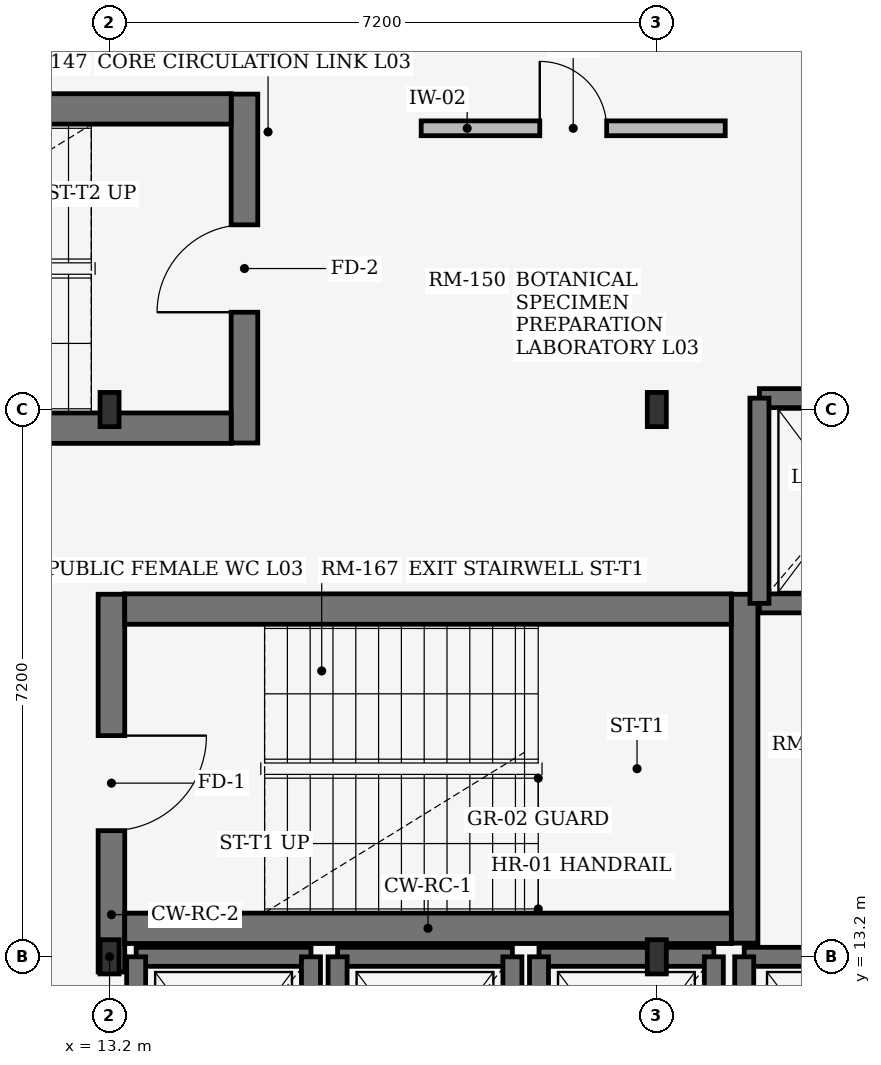
"""IFC4 building model, lengths in metres.
Left out: names, types, materials, properties, quantities, classifications, styles, units other than length and angle.
Written with IfcOpenShell. Run it as: python <this file> out.ifc"""

import sys

from ifc_helpers import new_model, si_unit, direction, frame, frame_2d, origin, origin_2d, place, context, subcontext, project, spatial, rectangle, i_section, extrude, element, fill, save


model = new_model("IFC4")
c1 = context("Model", 3, precision=1e-05, world=origin(), true_north=direction((0.0, 1.0)))
c2 = subcontext(c1, "Body", "Model", "MODEL_VIEW")
j1 = project(units=[si_unit("LENGTHUNIT", "METRE"), si_unit("PLANEANGLEUNIT", "RADIAN")], contexts=[c1])
p1 = place(None, origin())
s1 = spatial("IfcSite", under=j1, at=p1, CompositionType="ELEMENT")
p2 = place(p1, origin())
s2 = spatial("IfcBuilding", under=s1, at=p2, CompositionType="ELEMENT")
p3 = place(p2, frame((0.0, 0.0, 13.2)))
s3 = spatial("IfcBuildingStorey", under=s2, at=p3, CompositionType="ELEMENT", Elevation=13.2)
for number, where, z_axis, x_axis in (
    (1, (13.2, 13.2, 0.0), (0.0, 0.0, 1.0), (1.0, 0.0, 0.0)),
    (2, (13.2, 20.4, 0.0), (0.0, 0.0, 1.0), (1.0, 0.0, 0.0)),
    (3, (20.4, 13.2, 0.0), (0.0, 0.0, 1.0), (1.0, 0.0, 0.0)),
    (4, (20.4, 20.4, 0.0), (0.0, 0.0, 1.0), (1.0, 0.0, 0.0)),
):
    element("IfcColumn", number, at=place(p3, frame(where, z_axis=z_axis, x_axis=x_axis)), inside=s3, PredefinedType="COLUMN", context=c2, shape_type="SweptSolid", body=[
        extrude(i_section(OverallWidth=0.25, OverallDepth=0.45, WebThickness=0.011, FlangeThickness=0.014, at=origin_2d()), origin(), (0.0, 0.0, 1.0), 3.635),
    ])
p4 = place(p3, frame((13.225, 13.0, 0.0), z_axis=(0.0, 0.0, 1.0), x_axis=(0.0, 1.0, 0.0)))
e5 = element("IfcWall", 5, at=p4, inside=s3, PredefinedType="SHEAR", context=c2, shape_type="SweptSolid", body=[
    extrude(rectangle(XDim=4.97, YDim=0.35, at=frame_2d((2.485, 0.0))), origin(), (0.0, 0.0, 1.0), 3.635),
])
p5 = place(p4, frame((1.86, 0.0, 0.0)))
e6 = element("IfcOpeningElement", 6, at=p5, cuts=e5, PredefinedType="OPENING", context=c2, shape_type="SweptSolid", body=[
    extrude(rectangle(XDim=1.25, YDim=2.2, at=frame_2d((0.625, 1.1))), frame((0.0, 0.185, 0.0), z_axis=(0.0, -1.0, 0.0), x_axis=(1.0, 0.0, 0.0)), (0.0, 0.0, 1.0), 0.37),
])
p6 = place(p3, frame((21.555, 13.38, 0.0), z_axis=(0.0, 0.0, 1.0), x_axis=(0.0, 1.0, 0.0)))
e7 = element("IfcWall", 7, at=p6, inside=s3, PredefinedType="SHEAR", context=c2, shape_type="SweptSolid", body=[
    extrude(rectangle(XDim=4.59, YDim=0.35, at=frame_2d((2.295, 0.0))), origin(), (0.0, 0.0, 1.0), 3.635),
])
for number, where, z_axis, x_axis in (
    (8, (13.4, 13.575, 0.0), (0.0, 0.0, 1.0), (1.0, 0.0, 0.0)),
    (9, (13.4, 17.775, 0.0), (0.0, 0.0, 1.0), (1.0, 0.0, 0.0)),
):
    element("IfcWall", number, at=place(p3, frame(where, z_axis=z_axis, x_axis=x_axis)), inside=s3, PredefinedType="SHEAR", context=c2, shape_type="SweptSolid", body=[
        extrude(rectangle(XDim=7.98, YDim=0.4, at=frame_2d((3.99, 0.0))), origin(), (0.0, 0.0, 1.0), 3.635),
    ])
p7 = place(p3, frame((14.975, 24.55, 0.0), z_axis=(0.0, 0.0, 1.0), x_axis=(0.0, -1.0, 0.0)))
e10 = element("IfcWall", 10, at=p7, inside=s3, PredefinedType="SHEAR", context=c2, shape_type="SweptSolid", body=[
    extrude(rectangle(XDim=4.59, YDim=0.35, at=frame_2d((2.295, 0.0))), origin(), (0.0, 0.0, 1.0), 3.635),
])
p8 = place(p7, frame((1.72, 0.0, 0.0)))
e11 = element("IfcOpeningElement", 11, at=p8, cuts=e10, PredefinedType="OPENING", context=c2, shape_type="SweptSolid", body=[
    extrude(rectangle(XDim=1.15, YDim=2.2, at=frame_2d((0.575, 1.1))), frame((0.0, 0.185, 0.0), z_axis=(0.0, -1.0, 0.0), x_axis=(1.0, 0.0, 0.0)), (0.0, 0.0, 1.0), 0.37),
])
for number, where, z_axis, x_axis in (
    (12, (14.8, 24.355, 0.0), (0.0, 0.0, 1.0), (-1.0, 0.0, 0.0)),
    (13, (14.8, 20.155, 0.0), (0.0, 0.0, 1.0), (-1.0, 0.0, 0.0)),
):
    element("IfcWall", number, at=place(p3, frame(where, z_axis=z_axis, x_axis=x_axis)), inside=s3, PredefinedType="SHEAR", context=c2, shape_type="SweptSolid", body=[
        extrude(rectangle(XDim=7.98, YDim=0.4, at=frame_2d((3.99, 0.0))), origin(), (0.0, 0.0, 1.0), 3.635),
    ])
p9 = place(p3, frame((21.75, 17.85, 0.0), z_axis=(0.0, 0.0, 1.0), x_axis=(1.0, 0.0, 0.0)))
e14 = element("IfcWall", 14, at=p9, inside=s3, PredefinedType="SHEAR", context=c2, shape_type="SweptSolid", body=[
    extrude(rectangle(XDim=2.3, YDim=0.25, at=frame_2d((1.15, 0.0))), origin(), (0.0, 0.0, 1.0), 3.635),
])
p10 = place(p9, frame((0.6, 0.0, 0.0)))
e15 = element("IfcOpeningElement", 15, at=p10, cuts=e14, PredefinedType="OPENING", context=c2, shape_type="SweptSolid", body=[
    extrude(rectangle(XDim=1.1, YDim=2.2, at=frame_2d((0.55, 1.1))), frame((0.0, 0.135, 0.0), z_axis=(0.0, -1.0, 0.0), x_axis=(1.0, 0.0, 0.0)), (0.0, 0.0, 1.0), 0.27),
])
p11 = place(p3, frame((21.75, 20.55, 0.0), z_axis=(0.0, 0.0, 1.0), x_axis=(1.0, 0.0, 0.0)))
e16 = element("IfcWall", 16, at=p11, inside=s3, PredefinedType="SHEAR", context=c2, shape_type="SweptSolid", body=[
    extrude(rectangle(XDim=2.3, YDim=0.25, at=frame_2d((1.15, 0.0))), origin(), (0.0, 0.0, 1.0), 3.635),
])
p12 = place(p3, frame((21.75, 17.85, 0.0), z_axis=(0.0, 0.0, 1.0), x_axis=(0.0, 1.0, 0.0)))
e17 = element("IfcWall", 17, at=p12, inside=s3, PredefinedType="SHEAR", context=c2, shape_type="SweptSolid", body=[
    extrude(rectangle(XDim=2.7, YDim=0.25, at=frame_2d((1.35, 0.0))), origin(), (0.0, 0.0, 1.0), 3.635),
])
p13 = place(p3, frame((13.55, 13.2, 0.0), z_axis=(0.0, 0.0, 1.0), x_axis=(1.0, 0.0, 0.0)))
e18 = element("IfcWall", 18, at=p13, inside=s3, PredefinedType="SHEAR", context=c2, shape_type="SweptSolid", body=[
    extrude(rectangle(XDim=2.3, YDim=0.25, at=frame_2d((1.15, 0.0))), origin(), (0.0, 0.0, 1.0), 3.635),
])
for number, where, z_axis, x_axis in (
    (19, (13.55, 10.4, 0.0), (0.0, 0.0, 1.0), (0.0, 1.0, 0.0)),
    (20, (15.85, 10.4, 0.0), (0.0, 0.0, 1.0), (0.0, 1.0, 0.0)),
):
    element("IfcWall", number, at=place(p3, frame(where, z_axis=z_axis, x_axis=x_axis)), inside=s3, PredefinedType="SHEAR", context=c2, shape_type="SweptSolid", body=[
        extrude(rectangle(XDim=2.8, YDim=0.25, at=frame_2d((1.4, 0.0))), origin(), (0.0, 0.0, 1.0), 3.635),
    ])
p14 = place(p3, frame((16.2, 13.2, 0.0), z_axis=(0.0, 0.0, 1.0), x_axis=(1.0, 0.0, 0.0)))
e21 = element("IfcWall", 21, at=p14, inside=s3, PredefinedType="SHEAR", context=c2, shape_type="SweptSolid", body=[
    extrude(rectangle(XDim=2.3, YDim=0.25, at=frame_2d((1.15, 0.0))), origin(), (0.0, 0.0, 1.0), 3.635),
])
for number, where, z_axis, x_axis in (
    (22, (16.2, 10.4, 0.0), (0.0, 0.0, 1.0), (0.0, 1.0, 0.0)),
    (23, (18.5, 10.4, 0.0), (0.0, 0.0, 1.0), (0.0, 1.0, 0.0)),
):
    element("IfcWall", number, at=place(p3, frame(where, z_axis=z_axis, x_axis=x_axis)), inside=s3, PredefinedType="SHEAR", context=c2, shape_type="SweptSolid", body=[
        extrude(rectangle(XDim=2.8, YDim=0.25, at=frame_2d((1.4, 0.0))), origin(), (0.0, 0.0, 1.0), 3.635),
    ])
p15 = place(p3, frame((18.85, 13.2, 0.0), z_axis=(0.0, 0.0, 1.0), x_axis=(1.0, 0.0, 0.0)))
e24 = element("IfcWall", 24, at=p15, inside=s3, PredefinedType="SHEAR", context=c2, shape_type="SweptSolid", body=[
    extrude(rectangle(XDim=2.3, YDim=0.25, at=frame_2d((1.15, 0.0))), origin(), (0.0, 0.0, 1.0), 3.635),
])
for number, where, z_axis, x_axis in (
    (25, (18.85, 10.4, 0.0), (0.0, 0.0, 1.0), (0.0, 1.0, 0.0)),
    (26, (21.15, 10.4, 0.0), (0.0, 0.0, 1.0), (0.0, 1.0, 0.0)),
):
    element("IfcWall", number, at=place(p3, frame(where, z_axis=z_axis, x_axis=x_axis)), inside=s3, PredefinedType="SHEAR", context=c2, shape_type="SweptSolid", body=[
        extrude(rectangle(XDim=2.8, YDim=0.25, at=frame_2d((1.4, 0.0))), origin(), (0.0, 0.0, 1.0), 3.635),
    ])
p16 = place(p3, frame((21.55, 13.2, 0.0), z_axis=(0.0, 0.0, 1.0), x_axis=(1.0, 0.0, 0.0)))
e27 = element("IfcWall", 27, at=p16, inside=s3, PredefinedType="SHEAR", context=c2, shape_type="SweptSolid", body=[
    extrude(rectangle(XDim=2.6, YDim=0.25, at=frame_2d((1.3, 0.0))), origin(), (0.0, 0.0, 1.0), 3.635),
])
p17 = place(p3, frame((21.55, 10.2, 0.0), z_axis=(0.0, 0.0, 1.0), x_axis=(0.0, 1.0, 0.0)))
e28 = element("IfcWall", 28, at=p17, inside=s3, PredefinedType="SHEAR", context=c2, shape_type="SweptSolid", body=[
    extrude(rectangle(XDim=3.0, YDim=0.25, at=frame_2d((1.5, 0.0))), origin(), (0.0, 0.0, 1.0), 3.635),
])
p18 = place(p3, frame((17.3, 24.1, 0.0), z_axis=(0.0, 0.0, 1.0), x_axis=(1.0, 0.0, 0.0)))
e29 = element("IfcWall", 29, at=p18, inside=s3, PredefinedType="PARTITIONING", context=c2, shape_type="SweptSolid", body=[
    extrude(rectangle(XDim=4.0, YDim=0.195, at=frame_2d((2.0, 0.0))), origin(), (0.0, 0.0, 1.0), 3.615),
])
p19 = place(p18, frame((1.56, 0.0, 0.0)))
e30 = element("IfcOpeningElement", 30, at=p19, cuts=e29, PredefinedType="OPENING", context=c2, shape_type="SweptSolid", body=[
    extrude(rectangle(XDim=0.88, YDim=2.12, at=frame_2d((0.44, 1.06))), frame((0.0, 0.107, 0.0), z_axis=(0.0, -1.0, 0.0), x_axis=(1.0, 0.0, 0.0)), (0.0, 0.0, 1.0), 0.215),
])
p20 = place(p5, origin())
e31 = element("IfcDoor", 31, at=p20, inside=s3, OperationType="SINGLE_SWING_RIGHT", PredefinedType="DOOR", context=c2, shape_type="SweptSolid", body=[
    extrude(rectangle(XDim=1.25, YDim=2.2, at=frame_2d((0.625, 1.1))), frame((0.0, 0.025, 0.0), z_axis=(0.0, -1.0, 0.0), x_axis=(1.0, 0.0, 0.0)), (0.0, 0.0, 1.0), 0.05),
])
fill(e6, e31)
p21 = place(p8, origin())
e32 = element("IfcDoor", 32, at=p21, inside=s3, OperationType="SINGLE_SWING_RIGHT", PredefinedType="DOOR", context=c2, shape_type="SweptSolid", body=[
    extrude(rectangle(XDim=1.15, YDim=2.2, at=frame_2d((0.575, 1.1))), frame((0.0, 0.025, 0.0), z_axis=(0.0, -1.0, 0.0), x_axis=(1.0, 0.0, 0.0)), (0.0, 0.0, 1.0), 0.05),
])
fill(e11, e32)
p22 = place(p19, origin())
e33 = element("IfcDoor", 33, at=p22, inside=s3, OperationType="SINGLE_SWING_LEFT", PredefinedType="DOOR", context=c2, shape_type="SweptSolid", body=[
    extrude(rectangle(XDim=0.88, YDim=2.12, at=frame_2d((0.44, 1.06))), frame((0.0, 0.025, 0.0), z_axis=(0.0, -1.0, 0.0), x_axis=(1.0, 0.0, 0.0)), (0.0, 0.0, 1.0), 0.05),
])
fill(e30, e33)
save(model, sys.argv[1])
